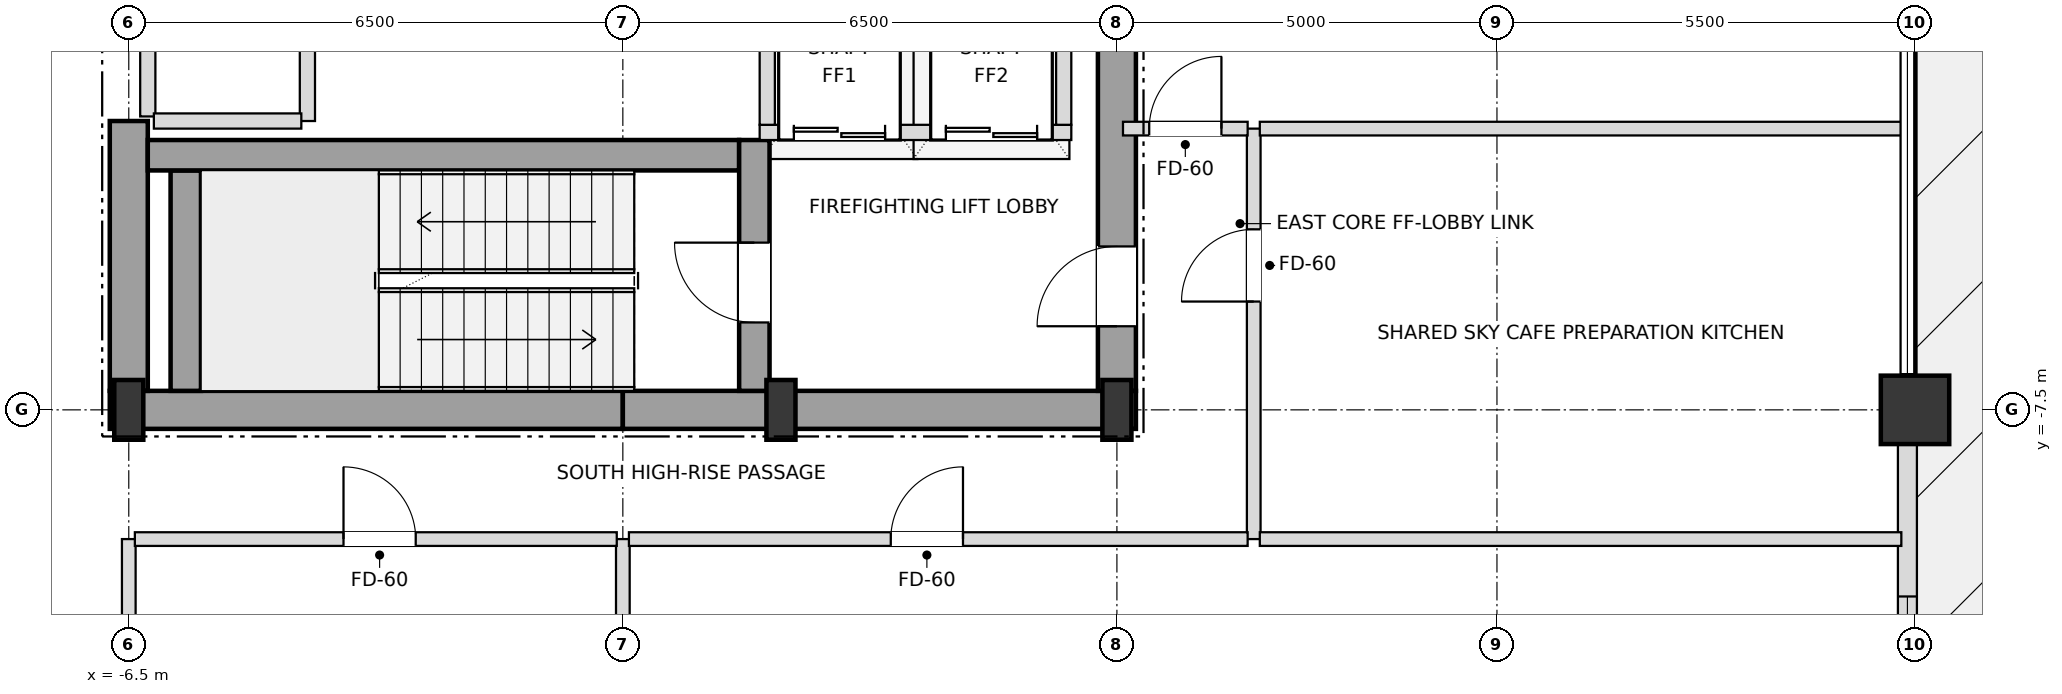
"""IFC4 building model, lengths in metres.
Left out: names, types, materials, properties, quantities, classifications, styles, units other than length and angle.
Written with IfcOpenShell. Run it as: python <this file> out.ifc"""

import sys

from ifc_helpers import new_model, si_unit, direction, frame, frame_2d, origin, origin_2d, place, context, subcontext, project, spatial, rectangle, i_section, extrude, element, fill, save


model = new_model("IFC4")
c1 = context("Model", 3, precision=1e-05, world=origin(), true_north=direction((0.0, 1.0)))
c2 = subcontext(c1, "Body", "Model", "MODEL_VIEW")
j1 = project(units=[si_unit("LENGTHUNIT", "METRE"), si_unit("PLANEANGLEUNIT", "RADIAN")], contexts=[c1])
p1 = place(None, origin())
s1 = spatial("IfcSite", under=j1, at=p1, CompositionType="ELEMENT")
p2 = place(p1, origin())
s2 = spatial("IfcBuilding", under=s1, at=p2, CompositionType="ELEMENT")
p3 = place(p2, frame((0.0, 0.0, 217.8)))
s3 = spatial("IfcBuildingStorey", under=s2, at=p3, CompositionType="ELEMENT", Elevation=217.8)
for number, where, z_axis, x_axis in (
    (1, (-6.5, -7.5, 0.0), (0.0, 0.0, 1.0), (1.0, 0.0, 0.0)),
    (2, (2.08, -7.5, 0.0), (0.0, 0.0, 1.0), (1.0, 0.0, 0.0)),
    (3, (6.5, -7.5, 0.0), (0.0, 0.0, 1.0), (1.0, 0.0, 0.0)),
):
    element("IfcColumn", number, at=place(p3, frame(where, z_axis=z_axis, x_axis=x_axis)), inside=s3, PredefinedType="COLUMN", context=c2, shape_type="SweptSolid", body=[
        extrude(i_section(OverallWidth=0.382, OverallDepth=0.786, WebThickness=0.02, FlangeThickness=0.033, at=origin_2d()), origin(), (0.0, 0.0, 1.0), 4.5),
    ])
p4 = place(p3, frame((17.0, -7.5, 0.0), z_axis=(0.0, 0.0, 1.0), x_axis=(1.0, 0.0, 0.0)))
e4 = element("IfcColumn", 4, at=p4, inside=s3, PredefinedType="USERDEFINED", context=c2, shape_type="SweptSolid", body=[
    extrude(rectangle(XDim=0.9, YDim=0.9, at=origin_2d()), origin(), (0.0, 0.0, 1.0), 4.5),
])
p5 = place(p3, frame((16.9, -12.555, 0.0), z_axis=(0.0, 0.0, 1.0), x_axis=(0.0, 1.0, 0.0)))
e5 = element("IfcWall", 5, at=p5, inside=s3, PredefinedType="SOLIDWALL", context=c2, shape_type="SweptSolid", body=[
    extrude(rectangle(XDim=4.61, YDim=0.25, at=frame_2d((2.305, 0.0))), origin(), (0.0, 0.0, 1.0), 3.648),
])
p6 = place(p5, frame((0.8, 0.0, 0.72)))
e6 = element("IfcOpeningElement", 6, at=p6, cuts=e5, PredefinedType="OPENING", context=c2, shape_type="SweptSolid", body=[
    extrude(rectangle(XDim=1.8, YDim=1.68, at=frame_2d((0.9, 0.84))), frame((0.0, 0.135, 0.0), z_axis=(0.0, -1.0, 0.0), x_axis=(1.0, 0.0, 0.0)), (0.0, 0.0, 1.0), 0.27),
])
for number, where, z_axis, x_axis in (
    (7, (-6.75, -7.5, 0.0), (0.0, 0.0, 1.0), (1.0, 0.0, 0.0)),
    (8, (0.0, -7.5, 0.0), (0.0, 0.0, 1.0), (1.0, 0.0, 0.0)),
):
    element("IfcWall", number, at=place(p3, frame(where, z_axis=z_axis, x_axis=x_axis)), inside=s3, PredefinedType="SHEAR", context=c2, shape_type="SweptSolid", body=[
        extrude(rectangle(XDim=6.75, YDim=0.5, at=frame_2d((3.375, 0.0))), origin(), (0.0, 0.0, 1.0), 4.28),
    ])
p7 = place(p3, frame((-6.5, -7.25, 0.0), z_axis=(0.0, 0.0, 1.0), x_axis=(0.0, 1.0, 0.0)))
e9 = element("IfcWall", 9, at=p7, inside=s3, PredefinedType="SHEAR", context=c2, shape_type="SweptSolid", body=[
    extrude(rectangle(XDim=3.55, YDim=0.5, at=frame_2d((1.775, 0.0))), origin(), (0.0, 0.0, 1.0), 4.28),
])
p8 = place(p3, frame((6.5, -7.25, 0.0), z_axis=(0.0, 0.0, 1.0), x_axis=(0.0, 1.0, 0.0)))
e10 = element("IfcWall", 10, at=p8, inside=s3, PredefinedType="SHEAR", context=c2, shape_type="SweptSolid", body=[
    extrude(rectangle(XDim=5.75, YDim=0.5, at=frame_2d((2.875, 0.0))), origin(), (0.0, 0.0, 1.0), 4.28),
])
p9 = place(p8, frame((0.85, 0.0, 0.0)))
e11 = element("IfcOpeningElement", 11, at=p9, cuts=e10, PredefinedType="OPENING", context=c2, shape_type="SweptSolid", body=[
    extrude(rectangle(XDim=1.05, YDim=2.15, at=frame_2d((0.525, 1.075))), frame((0.0, 0.26, 0.0), z_axis=(0.0, -1.0, 0.0), x_axis=(1.0, 0.0, 0.0)), (0.0, 0.0, 1.0), 0.52),
])
p10 = place(p3, frame((-5.75, -7.25, 0.0), z_axis=(0.0, 0.0, 1.0), x_axis=(0.0, 1.0, 0.0)))
e12 = element("IfcWall", 12, at=p10, inside=s3, PredefinedType="SHEAR", context=c2, shape_type="SweptSolid", body=[
    extrude(rectangle(XDim=2.9, YDim=0.4, at=frame_2d((1.45, 0.0))), origin(), (0.0, 0.0, 1.0), 4.28),
])
p11 = place(p3, frame((-6.25, -4.15, 0.0), z_axis=(0.0, 0.0, 1.0), x_axis=(1.0, 0.0, 0.0)))
e13 = element("IfcWall", 13, at=p11, inside=s3, PredefinedType="SHEAR", context=c2, shape_type="SweptSolid", body=[
    extrude(rectangle(XDim=7.78, YDim=0.4, at=frame_2d((3.89, 0.0))), origin(), (0.0, 0.0, 1.0), 4.28),
])
p12 = place(p3, frame((1.73, -7.25, 0.0), z_axis=(0.0, 0.0, 1.0), x_axis=(0.0, 1.0, 0.0)))
e14 = element("IfcWall", 14, at=p12, inside=s3, PredefinedType="SHEAR", context=c2, shape_type="SweptSolid", body=[
    extrude(rectangle(XDim=3.3, YDim=0.4, at=frame_2d((1.65, 0.0))), origin(), (0.0, 0.0, 1.0), 4.28),
])
p13 = place(p12, frame((0.9, 0.0, 0.0)))
e15 = element("IfcOpeningElement", 15, at=p13, cuts=e14, PredefinedType="OPENING", context=c2, shape_type="SweptSolid", body=[
    extrude(rectangle(XDim=1.05, YDim=2.15, at=frame_2d((0.525, 1.075))), frame((0.0, 0.21, 0.0), z_axis=(0.0, -1.0, 0.0), x_axis=(1.0, 0.0, 0.0)), (0.0, 0.0, 1.0), 0.42),
])
p14 = place(p3, frame((1.8, -3.85, 0.0), z_axis=(0.0, 0.0, 1.0), x_axis=(1.0, 0.0, 0.0)))
e16 = element("IfcWall", 16, at=p14, inside=s3, PredefinedType="SOLIDWALL", context=c2, shape_type="SweptSolid", body=[
    extrude(rectangle(XDim=4.1, YDim=0.2, at=frame_2d((2.05, 0.0))), origin(), (0.0, 0.0, 1.0), 4.28),
])
p15 = place(p14, frame((0.45, 0.0, 0.0)))
e17 = element("IfcOpeningElement", 17, at=p15, cuts=e16, PredefinedType="OPENING", context=c2, shape_type="SweptSolid", body=[
    extrude(rectangle(XDim=1.2, YDim=2.2, at=frame_2d((0.6, 1.1))), frame((0.0, 0.11, 0.0), z_axis=(0.0, -1.0, 0.0), x_axis=(1.0, 0.0, 0.0)), (0.0, 0.0, 1.0), 0.22),
])
p16 = place(p14, frame((2.45, 0.0, 0.0)))
e18 = element("IfcOpeningElement", 18, at=p16, cuts=e16, PredefinedType="OPENING", context=c2, shape_type="SweptSolid", body=[
    extrude(rectangle(XDim=1.2, YDim=2.2, at=frame_2d((0.6, 1.1))), frame((0.0, 0.11, 0.0), z_axis=(0.0, -1.0, 0.0), x_axis=(1.0, 0.0, 0.0)), (0.0, 0.0, 1.0), 0.22),
])
for number, where, z_axis, x_axis in (
    (19, (1.9, -3.75, 0.0), (0.0, 0.0, 1.0), (0.0, 1.0, 0.0)),
    (20, (5.8, -3.75, 0.0), (0.0, 0.0, 1.0), (0.0, 1.0, 0.0)),
):
    element("IfcWall", number, at=place(p3, frame(where, z_axis=z_axis, x_axis=x_axis)), inside=s3, PredefinedType="SOLIDWALL", context=c2, shape_type="SweptSolid", body=[
        extrude(rectangle(XDim=2.0, YDim=0.2, at=frame_2d((1.0, 0.0))), origin(), (0.0, 0.0, 1.0), 4.28),
    ])
p17 = place(p3, frame((-6.5, -19.9, 0.0), z_axis=(0.0, 0.0, 1.0), x_axis=(0.0, 1.0, 0.0)))
e21 = element("IfcWall", 21, at=p17, inside=s3, PredefinedType="PARTITIONING", context=c2, shape_type="SweptSolid", body=[
    extrude(rectangle(XDim=10.7, YDim=0.18, at=frame_2d((5.35, 0.0))), origin(), (0.0, 0.0, 1.0), 3.726),
])
p18 = place(p3, frame((-6.25, -3.64, 0.0), z_axis=(0.0, 0.0, 1.0), x_axis=(0.0, 1.0, 0.0)))
e22 = element("IfcWall", 22, at=p18, inside=s3, PredefinedType="SOLIDWALL", context=c2, shape_type="SweptSolid", body=[
    extrude(rectangle(XDim=7.34, YDim=0.2, at=frame_2d((3.67, 0.0))), origin(), (0.0, 0.0, 1.0), 4.28),
])
p19 = place(p3, frame((-4.15, -3.7, 0.0), z_axis=(0.0, 0.0, 1.0), x_axis=(0.0, 1.0, 0.0)))
e23 = element("IfcWall", 23, at=p19, inside=s3, PredefinedType="SOLIDWALL", context=c2, shape_type="SweptSolid", body=[
    extrude(rectangle(XDim=7.4, YDim=0.2, at=frame_2d((3.7, 0.0))), origin(), (0.0, 0.0, 1.0), 4.28),
])
p20 = place(p19, frame((2.025, 0.0, 0.0)))
e24 = element("IfcOpeningElement", 24, at=p20, cuts=e23, PredefinedType="OPENING", context=c2, shape_type="SweptSolid", body=[
    extrude(rectangle(XDim=0.95, YDim=2.15, at=frame_2d((0.475, 1.075))), frame((0.0, 0.11, 0.0), z_axis=(0.0, -1.0, 0.0), x_axis=(1.0, 0.0, 0.0)), (0.0, 0.0, 1.0), 0.22),
])
p21 = place(p19, frame((5.775, 0.0, 0.0)))
e25 = element("IfcOpeningElement", 25, at=p21, cuts=e23, PredefinedType="OPENING", context=c2, shape_type="SweptSolid", body=[
    extrude(rectangle(XDim=0.95, YDim=2.15, at=frame_2d((0.475, 1.075))), frame((0.0, 0.11, 0.0), z_axis=(0.0, -1.0, 0.0), x_axis=(1.0, 0.0, 0.0)), (0.0, 0.0, 1.0), 0.22),
])
p22 = place(p3, frame((0.0, -19.9, 0.0), z_axis=(0.0, 0.0, 1.0), x_axis=(0.0, 1.0, 0.0)))
e26 = element("IfcWall", 26, at=p22, inside=s3, PredefinedType="PARTITIONING", context=c2, shape_type="SweptSolid", body=[
    extrude(rectangle(XDim=10.7, YDim=0.18, at=frame_2d((5.35, 0.0))), origin(), (0.0, 0.0, 1.0), 3.918),
])
p23 = place(p3, frame((8.3, -9.2, 0.0), z_axis=(0.0, 0.0, 1.0), x_axis=(0.0, 1.0, 0.0)))
e27 = element("IfcWall", 27, at=p23, inside=s3, PredefinedType="PARTITIONING", context=c2, shape_type="SweptSolid", body=[
    extrude(rectangle(XDim=5.4, YDim=0.18, at=frame_2d((2.7, 0.0))), origin(), (0.0, 0.0, 1.0), 3.726),
])
p24 = place(p23, frame((3.125, 0.0, 0.0)))
e28 = element("IfcOpeningElement", 28, at=p24, cuts=e27, PredefinedType="OPENING", context=c2, shape_type="SweptSolid", body=[
    extrude(rectangle(XDim=0.95, YDim=2.15, at=frame_2d((0.475, 1.075))), frame((0.0, 0.1, 0.0), z_axis=(0.0, -1.0, 0.0), x_axis=(1.0, 0.0, 0.0)), (0.0, 0.0, 1.0), 0.2),
])
p25 = place(p3, frame((-6.42, -9.2, 0.0), z_axis=(0.0, 0.0, 1.0), x_axis=(1.0, 0.0, 0.0)))
e29 = element("IfcWall", 29, at=p25, inside=s3, PredefinedType="PARTITIONING", context=c2, shape_type="SweptSolid", body=[
    extrude(rectangle(XDim=6.34, YDim=0.18, at=frame_2d((3.17, 0.0))), origin(), (0.0, 0.0, 1.0), 4.28),
])
p26 = place(p25, frame((2.745, 0.0, 0.0)))
e30 = element("IfcOpeningElement", 30, at=p26, cuts=e29, PredefinedType="OPENING", context=c2, shape_type="SweptSolid", body=[
    extrude(rectangle(XDim=0.95, YDim=2.15, at=frame_2d((0.475, 1.075))), frame((0.0, 0.1, 0.0), z_axis=(0.0, -1.0, 0.0), x_axis=(1.0, 0.0, 0.0)), (0.0, 0.0, 1.0), 0.2),
])
p27 = place(p3, frame((0.08, -9.2, 0.0), z_axis=(0.0, 0.0, 1.0), x_axis=(1.0, 0.0, 0.0)))
e31 = element("IfcWall", 31, at=p27, inside=s3, PredefinedType="PARTITIONING", context=c2, shape_type="SweptSolid", body=[
    extrude(rectangle(XDim=8.14, YDim=0.18, at=frame_2d((4.07, 0.0))), origin(), (0.0, 0.0, 1.0), 3.726),
])
p28 = place(p27, frame((3.445, 0.0, 0.0)))
e32 = element("IfcOpeningElement", 32, at=p28, cuts=e31, PredefinedType="OPENING", context=c2, shape_type="SweptSolid", body=[
    extrude(rectangle(XDim=0.95, YDim=2.15, at=frame_2d((0.475, 1.075))), frame((0.0, 0.1, 0.0), z_axis=(0.0, -1.0, 0.0), x_axis=(1.0, 0.0, 0.0)), (0.0, 0.0, 1.0), 0.2),
])
p29 = place(p3, frame((8.38, -9.2, 0.0), z_axis=(0.0, 0.0, 1.0), x_axis=(1.0, 0.0, 0.0)))
e33 = element("IfcWall", 33, at=p29, inside=s3, PredefinedType="PARTITIONING", context=c2, shape_type="SweptSolid", body=[
    extrude(rectangle(XDim=8.44, YDim=0.18, at=frame_2d((4.22, 0.0))), origin(), (0.0, 0.0, 1.0), 4.28),
])
p30 = place(p3, frame((6.58, -3.8, 0.0), z_axis=(0.0, 0.0, 1.0), x_axis=(1.0, 0.0, 0.0)))
e34 = element("IfcWall", 34, at=p30, inside=s3, PredefinedType="PARTITIONING", context=c2, shape_type="SweptSolid", body=[
    extrude(rectangle(XDim=1.64, YDim=0.18, at=frame_2d((0.82, 0.0))), origin(), (0.0, 0.0, 1.0), 4.28),
])
p31 = place(p30, frame((0.345, 0.0, 0.0)))
e35 = element("IfcOpeningElement", 35, at=p31, cuts=e34, PredefinedType="OPENING", context=c2, shape_type="SweptSolid", body=[
    extrude(rectangle(XDim=0.95, YDim=2.15, at=frame_2d((0.475, 1.075))), frame((0.0, 0.1, 0.0), z_axis=(0.0, -1.0, 0.0), x_axis=(1.0, 0.0, 0.0)), (0.0, 0.0, 1.0), 0.2),
])
p32 = place(p3, frame((8.38, -3.8, 0.0), z_axis=(0.0, 0.0, 1.0), x_axis=(1.0, 0.0, 0.0)))
e36 = element("IfcWall", 36, at=p32, inside=s3, PredefinedType="PARTITIONING", context=c2, shape_type="SweptSolid", body=[
    extrude(rectangle(XDim=8.44, YDim=0.18, at=frame_2d((4.22, 0.0))), origin(), (0.0, 0.0, 1.0), 3.918),
])
p33 = place(p3, frame((-6.17, -3.7, 0.0), z_axis=(0.0, 0.0, 1.0), x_axis=(1.0, 0.0, 0.0)))
e37 = element("IfcWall", 37, at=p33, inside=s3, PredefinedType="SOLIDWALL", context=c2, shape_type="SweptSolid", body=[
    extrude(rectangle(XDim=1.94, YDim=0.2, at=frame_2d((0.97, 0.0))), origin(), (0.0, 0.0, 1.0), 4.28),
])
p34 = place(p6, origin())
e38 = element("IfcWindow", 38, at=p34, inside=s3, PartitioningType="SINGLE_PANEL", PredefinedType="WINDOW", context=c2, shape_type="SweptSolid", body=[
    extrude(rectangle(XDim=1.8, YDim=1.68, at=frame_2d((0.9, 0.84))), frame((0.0, 0.03, 0.0), z_axis=(0.0, -1.0, 0.0), x_axis=(1.0, 0.0, 0.0)), (0.0, 0.0, 1.0), 0.06),
])
fill(e6, e38)
p35 = place(p9, origin())
e39 = element("IfcDoor", 39, at=p35, inside=s3, OperationType="SINGLE_SWING_LEFT", PredefinedType="DOOR", context=c2, shape_type="SweptSolid", body=[
    extrude(rectangle(XDim=1.05, YDim=2.15, at=frame_2d((0.525, 1.075))), frame((0.0, 0.025, 0.0), z_axis=(0.0, -1.0, 0.0), x_axis=(1.0, 0.0, 0.0)), (0.0, 0.0, 1.0), 0.05),
])
fill(e11, e39)
p36 = place(p13, origin())
e40 = element("IfcDoor", 40, at=p36, inside=s3, OperationType="SINGLE_SWING_RIGHT", PredefinedType="DOOR", context=c2, shape_type="SweptSolid", body=[
    extrude(rectangle(XDim=1.05, YDim=2.15, at=frame_2d((0.525, 1.075))), frame((0.0, 0.025, 0.0), z_axis=(0.0, -1.0, 0.0), x_axis=(1.0, 0.0, 0.0)), (0.0, 0.0, 1.0), 0.05),
])
fill(e15, e40)
p37 = place(p15, origin())
e41 = element("IfcDoor", 41, at=p37, inside=s3, OperationType="DOUBLE_DOOR_SLIDING", PredefinedType="DOOR", context=c2, shape_type="SweptSolid", body=[
    extrude(rectangle(XDim=1.2, YDim=2.2, at=frame_2d((0.6, 1.1))), frame((0.0, 0.025, 0.0), z_axis=(0.0, -1.0, 0.0), x_axis=(1.0, 0.0, 0.0)), (0.0, 0.0, 1.0), 0.05),
])
fill(e17, e41)
p38 = place(p16, origin())
e42 = element("IfcDoor", 42, at=p38, inside=s3, OperationType="DOUBLE_DOOR_SLIDING", PredefinedType="DOOR", context=c2, shape_type="SweptSolid", body=[
    extrude(rectangle(XDim=1.2, YDim=2.2, at=frame_2d((0.6, 1.1))), frame((0.0, 0.025, 0.0), z_axis=(0.0, -1.0, 0.0), x_axis=(1.0, 0.0, 0.0)), (0.0, 0.0, 1.0), 0.05),
])
fill(e18, e42)
p39 = place(p26, origin())
e43 = element("IfcDoor", 43, at=p39, inside=s3, OperationType="SINGLE_SWING_LEFT", PredefinedType="DOOR", context=c2, shape_type="SweptSolid", body=[
    extrude(rectangle(XDim=0.95, YDim=2.15, at=frame_2d((0.475, 1.075))), frame((0.0, 0.025, 0.0), z_axis=(0.0, -1.0, 0.0), x_axis=(1.0, 0.0, 0.0)), (0.0, 0.0, 1.0), 0.05),
])
fill(e30, e43)
p40 = place(p28, origin())
e44 = element("IfcDoor", 44, at=p40, inside=s3, OperationType="SINGLE_SWING_RIGHT", PredefinedType="DOOR", context=c2, shape_type="SweptSolid", body=[
    extrude(rectangle(XDim=0.95, YDim=2.15, at=frame_2d((0.475, 1.075))), frame((0.0, 0.025, 0.0), z_axis=(0.0, -1.0, 0.0), x_axis=(1.0, 0.0, 0.0)), (0.0, 0.0, 1.0), 0.05),
])
fill(e32, e44)
p41 = place(p24, origin())
e45 = element("IfcDoor", 45, at=p41, inside=s3, OperationType="SINGLE_SWING_LEFT", PredefinedType="DOOR", context=c2, shape_type="SweptSolid", body=[
    extrude(rectangle(XDim=0.95, YDim=2.15, at=frame_2d((0.475, 1.075))), frame((0.0, 0.025, 0.0), z_axis=(0.0, -1.0, 0.0), x_axis=(1.0, 0.0, 0.0)), (0.0, 0.0, 1.0), 0.05),
])
fill(e28, e45)
p42 = place(p31, origin())
e46 = element("IfcDoor", 46, at=p42, inside=s3, OperationType="SINGLE_SWING_RIGHT", PredefinedType="DOOR", context=c2, shape_type="SweptSolid", body=[
    extrude(rectangle(XDim=0.95, YDim=2.15, at=frame_2d((0.475, 1.075))), frame((0.0, 0.025, 0.0), z_axis=(0.0, -1.0, 0.0), x_axis=(1.0, 0.0, 0.0)), (0.0, 0.0, 1.0), 0.05),
])
fill(e35, e46)
save(model, sys.argv[1])
